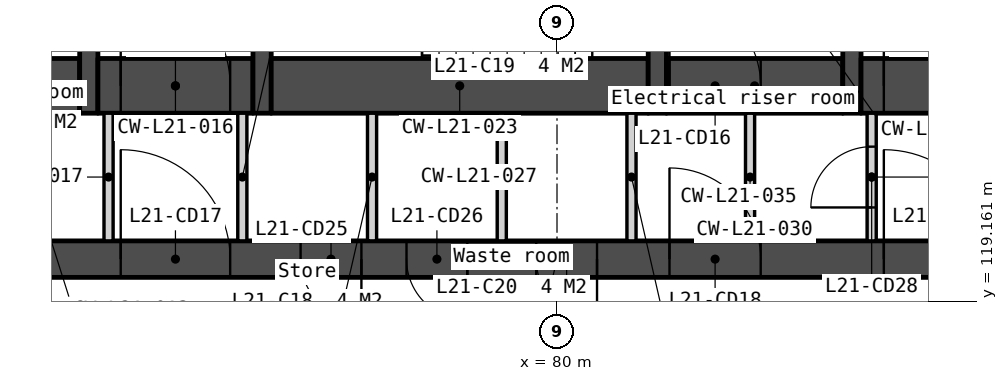
"""IFC4 building model, lengths in metres.
Left out: names, types, materials, properties, quantities, classifications, styles, units other than length and angle.
Written with IfcOpenShell. Run it as: python <this file> out.ifc"""

import sys

from ifc_helpers import new_model, si_unit, direction, frame, frame_2d, origin, place, context, subcontext, project, spatial, polyline, rectangle, outline, extrude, element, fill, save


model = new_model("IFC4")
c1 = context("Model", 3, precision=1e-05, world=origin(), true_north=direction((0.0, 1.0)))
c2 = subcontext(c1, "Body", "Model", "MODEL_VIEW")
j1 = project(units=[si_unit("LENGTHUNIT", "METRE"), si_unit("PLANEANGLEUNIT", "RADIAN")], contexts=[c1])
p1 = place(None, origin())
s1 = spatial("IfcSite", under=j1, at=p1, CompositionType="ELEMENT")
p2 = place(p1, origin())
s2 = spatial("IfcBuilding", under=s1, at=p2, CompositionType="ELEMENT")
p3 = place(p2, frame((0.0, 0.0, 88.8)))
s3 = spatial("IfcBuildingStorey", under=s2, at=p3, CompositionType="ELEMENT", Elevation=88.8)
p4 = place(p3, frame((66.0, 119.85, 0.0), z_axis=(0.0, 0.0, 1.0), x_axis=(1.0, 0.0, 0.0)))
e1 = element("IfcWall", 1, at=p4, inside=s3, PredefinedType="SOLIDWALL", context=c2, shape_type="SweptSolid", body=[
    extrude(rectangle(XDim=28.0, YDim=0.6, at=frame_2d((14.0, 0.0))), origin(), (0.0, 0.0, 1.0), 3.35),
])
p5 = place(p4, frame((6.825, 0.0, 0.0)))
e2 = element("IfcOpeningElement", 2, at=p5, cuts=e1, PredefinedType="OPENING", context=c2, shape_type="SweptSolid", body=[
    extrude(rectangle(XDim=1.8, YDim=2.1, at=frame_2d((0.9, 1.05))), frame((0.0, 0.31, 0.0), z_axis=(0.0, -1.0, 0.0), x_axis=(1.0, 0.0, 0.0)), (0.0, 0.0, 1.0), 0.62),
])
p6 = place(p4, frame((15.85, 0.0, 0.0)))
e3 = element("IfcOpeningElement", 3, at=p6, cuts=e1, PredefinedType="OPENING", context=c2, shape_type="SweptSolid", body=[
    extrude(rectangle(XDim=1.5, YDim=2.1, at=frame_2d((0.75, 1.05))), frame((0.0, 0.31, 0.0), z_axis=(0.0, -1.0, 0.0), x_axis=(1.0, 0.0, 0.0)), (0.0, 0.0, 1.0), 0.62),
])
p7 = place(p4, frame((19.375, 0.0, 0.0)))
e4 = element("IfcOpeningElement", 4, at=p7, cuts=e1, PredefinedType="OPENING", context=c2, shape_type="SweptSolid", body=[
    extrude(rectangle(XDim=1.8, YDim=2.1, at=frame_2d((0.9, 1.05))), frame((0.0, 0.31, 0.0), z_axis=(0.0, -1.0, 0.0), x_axis=(1.0, 0.0, 0.0)), (0.0, 0.0, 1.0), 0.62),
])
p8 = place(p4, frame((4.425, 0.0, 0.0)))
e5 = element("IfcOpeningElement", 5, at=p8, cuts=e1, PredefinedType="OPENING", context=c2, shape_type="SweptSolid", body=[
    extrude(rectangle(XDim=1.0, YDim=2.1, at=frame_2d((0.5, 1.05))), frame((0.0, 0.31, 0.0), z_axis=(0.0, -1.0, 0.0), x_axis=(1.0, 0.0, 0.0)), (0.0, 0.0, 1.0), 0.62),
])
p9 = place(p4, frame((9.783, 0.0, 0.0)))
e6 = element("IfcOpeningElement", 6, at=p9, cuts=e1, PredefinedType="OPENING", context=c2, shape_type="SweptSolid", body=[
    extrude(rectangle(XDim=1.0, YDim=2.1, at=frame_2d((0.5, 1.05))), frame((0.0, 0.31, 0.0), z_axis=(0.0, -1.0, 0.0), x_axis=(1.0, 0.0, 0.0)), (0.0, 0.0, 1.0), 0.62),
])
p10 = place(p4, frame((11.525, 0.0, 0.0)))
e7 = element("IfcOpeningElement", 7, at=p10, cuts=e1, PredefinedType="OPENING", context=c2, shape_type="SweptSolid", body=[
    extrude(rectangle(XDim=1.0, YDim=2.1, at=frame_2d((0.5, 1.05))), frame((0.0, 0.31, 0.0), z_axis=(0.0, -1.0, 0.0), x_axis=(1.0, 0.0, 0.0)), (0.0, 0.0, 1.0), 0.62),
])
p11 = place(p4, frame((13.658, 0.0, 0.0)))
e8 = element("IfcOpeningElement", 8, at=p11, cuts=e1, PredefinedType="OPENING", context=c2, shape_type="SweptSolid", body=[
    extrude(rectangle(XDim=1.0, YDim=2.1, at=frame_2d((0.5, 1.05))), frame((0.0, 0.31, 0.0), z_axis=(0.0, -1.0, 0.0), x_axis=(1.0, 0.0, 0.0)), (0.0, 0.0, 1.0), 0.62),
])
p12 = place(p4, frame((21.725, 0.0, 0.0)))
e9 = element("IfcOpeningElement", 9, at=p12, cuts=e1, PredefinedType="OPENING", context=c2, shape_type="SweptSolid", body=[
    extrude(rectangle(XDim=1.0, YDim=2.1, at=frame_2d((0.5, 1.05))), frame((0.0, 0.31, 0.0), z_axis=(0.0, -1.0, 0.0), x_axis=(1.0, 0.0, 0.0)), (0.0, 0.0, 1.0), 0.62),
])
p13 = place(p4, frame((23.425, 0.0, 0.0)))
e10 = element("IfcOpeningElement", 10, at=p13, cuts=e1, PredefinedType="OPENING", context=c2, shape_type="SweptSolid", body=[
    extrude(rectangle(XDim=1.0, YDim=2.1, at=frame_2d((0.5, 1.05))), frame((0.0, 0.31, 0.0), z_axis=(0.0, -1.0, 0.0), x_axis=(1.0, 0.0, 0.0)), (0.0, 0.0, 1.0), 0.62),
])
p14 = place(p3, frame((69.6, 122.7, 0.0), z_axis=(0.0, 0.0, 1.0), x_axis=(1.0, 0.0, 0.0)))
e11 = element("IfcWall", 11, at=p14, inside=s3, PredefinedType="SOLIDWALL", context=c2, shape_type="SweptSolid", body=[
    extrude(rectangle(XDim=2.55, YDim=0.9, at=frame_2d((1.275, 0.0))), origin(), (0.0, 0.0, 1.0), 3.35),
])
p15 = place(p3, frame((72.3, 133.95, 0.0), z_axis=(0.0, 0.0, 1.0), x_axis=(0.0, -1.0, 0.0)))
e12 = element("IfcWall", 12, at=p15, inside=s3, PredefinedType="SOLIDWALL", context=c2, shape_type="SweptSolid", body=[
    extrude(rectangle(XDim=11.7, YDim=0.3, at=frame_2d((5.85, 0.0))), origin(), (0.0, 0.0, 1.0), 3.35),
])
p16 = place(p15, frame((6.95, 0.0, 0.0)))
e13 = element("IfcOpeningElement", 13, at=p16, cuts=e12, PredefinedType="OPENING", context=c2, shape_type="SweptSolid", body=[
    extrude(rectangle(XDim=1.1, YDim=2.1, at=frame_2d((0.55, 1.05))), frame((0.0, 0.16, 0.0), z_axis=(0.0, -1.0, 0.0), x_axis=(1.0, 0.0, 0.0)), (0.0, 0.0, 1.0), 0.32),
])
p17 = place(p15, frame((9.35, 0.0, 0.0)))
e14 = element("IfcOpeningElement", 14, at=p17, cuts=e12, PredefinedType="OPENING", context=c2, shape_type="SweptSolid", body=[
    extrude(rectangle(XDim=0.9, YDim=2.1, at=frame_2d((0.45, 1.05))), frame((0.0, 0.16, 0.0), z_axis=(0.0, -1.0, 0.0), x_axis=(1.0, 0.0, 0.0)), (0.0, 0.0, 1.0), 0.32),
])
p18 = place(p15, frame((5.1, 0.0, 0.0)))
e15 = element("IfcOpeningElement", 15, at=p18, cuts=e12, PredefinedType="OPENING", context=c2, shape_type="SweptSolid", body=[
    extrude(rectangle(XDim=1.0, YDim=2.1, at=frame_2d((0.5, 1.05))), frame((0.0, 0.16, 0.0), z_axis=(0.0, -1.0, 0.0), x_axis=(1.0, 0.0, 0.0)), (0.0, 0.0, 1.0), 0.32),
])
p19 = place(p3, frame((72.45, 122.7, 0.0), z_axis=(0.0, 0.0, 1.0), x_axis=(1.0, 0.0, 0.0)))
e16 = element("IfcWall", 16, at=p19, inside=s3, PredefinedType="SOLIDWALL", context=c2, shape_type="SweptSolid", body=[
    extrude(rectangle(XDim=2.55, YDim=0.9, at=frame_2d((1.275, 0.0))), origin(), (0.0, 0.0, 1.0), 3.35),
])
p20 = place(p19, frame((0.375, 0.0, 0.0)))
e17 = element("IfcOpeningElement", 17, at=p20, cuts=e16, PredefinedType="OPENING", context=c2, shape_type="SweptSolid", body=[
    extrude(rectangle(XDim=1.8, YDim=2.1, at=frame_2d((0.9, 1.05))), frame((0.0, 0.46, 0.0), z_axis=(0.0, -1.0, 0.0), x_axis=(1.0, 0.0, 0.0)), (0.0, 0.0, 1.0), 0.92),
])
for number, where, z_axis, x_axis in (
    (18, (72.625, 122.25, 0.0), (0.0, 0.0, 1.0), (0.0, -1.0, 0.0)),
    (19, (74.825, 122.25, 0.0), (0.0, 0.0, 1.0), (0.0, -1.0, 0.0)),
):
    element("IfcWall", number, at=place(p3, frame(where, z_axis=z_axis, x_axis=x_axis)), inside=s3, PredefinedType="PARTITIONING", context=c2, shape_type="SweptSolid", body=[
        extrude(rectangle(XDim=2.1, YDim=0.15, at=frame_2d((1.05, 0.0))), origin(), (0.0, 0.0, 1.0), 3.35),
    ])
p21 = place(p3, frame((75.15, 133.95, 0.0), z_axis=(0.0, 0.0, 1.0), x_axis=(0.0, -1.0, 0.0)))
e20 = element("IfcWall", 20, at=p21, inside=s3, PredefinedType="SOLIDWALL", context=c2, shape_type="SweptSolid", body=[
    extrude(rectangle(XDim=11.7, YDim=0.3, at=frame_2d((5.85, 0.0))), origin(), (0.0, 0.0, 1.0), 3.35),
])
p22 = place(p3, frame((75.3, 122.7, 0.0), z_axis=(0.0, 0.0, 1.0), x_axis=(1.0, 0.0, 0.0)))
e21 = element("IfcWall", 21, at=p22, inside=s3, PredefinedType="SOLIDWALL", context=c2, shape_type="SweptSolid", body=[
    extrude(rectangle(XDim=6.2, YDim=0.9, at=frame_2d((3.1, 0.0))), origin(), (0.0, 0.0, 1.0), 3.35),
])
for number, where, z_axis, x_axis in (
    (22, (76.958, 122.25, 0.0), (0.0, 0.0, 1.0), (0.0, -1.0, 0.0)),
    (23, (79.092, 122.25, 0.0), (0.0, 0.0, 1.0), (0.0, -1.0, 0.0)),
    (24, (81.225, 122.25, 0.0), (0.0, 0.0, 1.0), (0.0, -1.0, 0.0)),
):
    element("IfcWall", number, at=place(p3, frame(where, z_axis=z_axis, x_axis=x_axis)), inside=s3, PredefinedType="PARTITIONING", context=c2, shape_type="SweptSolid", body=[
        extrude(rectangle(XDim=2.1, YDim=0.15, at=frame_2d((1.05, 0.0))), origin(), (0.0, 0.0, 1.0), 3.35),
    ])
p23 = place(p3, frame((81.65, 125.7, 0.0), z_axis=(0.0, 0.0, 1.0), x_axis=(0.0, -1.0, 0.0)))
e25 = element("IfcWall", 25, at=p23, inside=s3, PredefinedType="SOLIDWALL", context=c2, shape_type="SweptSolid", body=[
    extrude(rectangle(XDim=3.45, YDim=0.3, at=frame_2d((1.725, 0.0))), origin(), (0.0, 0.0, 1.0), 3.35),
])
p24 = place(p23, frame((0.75, 0.0, 0.0)))
e26 = element("IfcOpeningElement", 26, at=p24, cuts=e25, PredefinedType="OPENING", context=c2, shape_type="SweptSolid", body=[
    extrude(rectangle(XDim=1.0, YDim=2.1, at=frame_2d((0.5, 1.05))), frame((0.0, 0.16, 0.0), z_axis=(0.0, -1.0, 0.0), x_axis=(1.0, 0.0, 0.0)), (0.0, 0.0, 1.0), 0.32),
])
p25 = place(p3, frame((81.8, 122.7, 0.0), z_axis=(0.0, 0.0, 1.0), x_axis=(1.0, 0.0, 0.0)))
e27 = element("IfcWall", 27, at=p25, inside=s3, PredefinedType="SOLIDWALL", context=c2, shape_type="SweptSolid", body=[
    extrude(rectangle(XDim=2.9, YDim=0.9, at=frame_2d((1.45, 0.0))), origin(), (0.0, 0.0, 1.0), 3.35),
])
p26 = place(p25, frame((0.05, 0.0, 0.0)))
e28 = element("IfcOpeningElement", 28, at=p26, cuts=e27, PredefinedType="OPENING", context=c2, shape_type="SweptSolid", body=[
    extrude(rectangle(XDim=1.5, YDim=2.1, at=frame_2d((0.75, 1.05))), frame((0.0, 0.46, 0.0), z_axis=(0.0, -1.0, 0.0), x_axis=(1.0, 0.0, 0.0)), (0.0, 0.0, 1.0), 0.92),
])
p27 = place(p3, frame((83.175, 122.25, 0.0), z_axis=(0.0, 0.0, 1.0), x_axis=(0.0, -1.0, 0.0)))
e29 = element("IfcWall", 29, at=p27, inside=s3, PredefinedType="PARTITIONING", context=c2, shape_type="SweptSolid", body=[
    extrude(rectangle(XDim=2.1, YDim=0.15, at=frame_2d((1.05, 0.0))), origin(), (0.0, 0.0, 1.0), 3.35),
])
p28 = place(p3, frame((84.85, 133.95, 0.0), z_axis=(0.0, 0.0, 1.0), x_axis=(0.0, -1.0, 0.0)))
e30 = element("IfcWall", 30, at=p28, inside=s3, PredefinedType="SOLIDWALL", context=c2, shape_type="SweptSolid", body=[
    extrude(rectangle(XDim=11.7, YDim=0.3, at=frame_2d((5.85, 0.0))), origin(), (0.0, 0.0, 1.0), 3.35),
])
p29 = place(p3, frame((85.0, 122.7, 0.0), z_axis=(0.0, 0.0, 1.0), x_axis=(1.0, 0.0, 0.0)))
e31 = element("IfcWall", 31, at=p29, inside=s3, PredefinedType="SOLIDWALL", context=c2, shape_type="SweptSolid", body=[
    extrude(rectangle(XDim=2.55, YDim=0.9, at=frame_2d((1.275, 0.0))), origin(), (0.0, 0.0, 1.0), 3.35),
])
p30 = place(p29, frame((0.375, 0.0, 0.0)))
e32 = element("IfcOpeningElement", 32, at=p30, cuts=e31, PredefinedType="OPENING", context=c2, shape_type="SweptSolid", body=[
    extrude(rectangle(XDim=1.8, YDim=2.1, at=frame_2d((0.9, 1.05))), frame((0.0, 0.46, 0.0), z_axis=(0.0, -1.0, 0.0), x_axis=(1.0, 0.0, 0.0)), (0.0, 0.0, 1.0), 0.92),
])
p31 = place(p3, frame((85.175, 122.25, 0.0), z_axis=(0.0, 0.0, 1.0), x_axis=(0.0, -1.0, 0.0)))
e33 = element("IfcWall", 33, at=p31, inside=s3, PredefinedType="PARTITIONING", context=c2, shape_type="SweptSolid", body=[
    extrude(rectangle(XDim=2.1, YDim=0.15, at=frame_2d((1.05, 0.0))), origin(), (0.0, 0.0, 1.0), 3.35),
])
p32 = place(p31, frame((0.55, 0.0, 0.0)))
e34 = element("IfcOpeningElement", 34, at=p32, cuts=e33, PredefinedType="OPENING", context=c2, shape_type="SweptSolid", body=[
    extrude(rectangle(XDim=1.0, YDim=2.1, at=frame_2d((0.5, 1.05))), frame((0.0, 0.085, 0.0), z_axis=(0.0, -1.0, 0.0), x_axis=(1.0, 0.0, 0.0)), (0.0, 0.0, 1.0), 0.17),
])
p33 = place(p3, frame((56.073, 130.263, -0.15), z_axis=(0.0, 0.0, 1.0), x_axis=(0.500000478905, -0.866025127289, 0.0)))
e35 = element("IfcWall", 35, at=p33, inside=s3, PredefinedType="SOLIDWALL", context=c2, shape_type="SweptSolid", body=[
    extrude(outline(polyline([(42.643, 0.0), (42.643, 3.5), (0.0, 3.5), (0.0, 0.0), (42.643, 0.0)])), frame((0.0, 0.225, 0.0), z_axis=(0.0, -1.0, 0.0), x_axis=(1.0, 0.0, 0.0)), (0.0, 0.0, 1.0), 0.45),
])
p34 = place(p33, frame((0.72, 0.0, 1.05)))
e36 = element("IfcOpeningElement", 36, at=p34, cuts=e35, PredefinedType="OPENING", context=c2, shape_type="SweptSolid", body=[
    extrude(rectangle(XDim=1.2, YDim=1.5, at=frame_2d((0.6, 0.75))), frame((0.0, 0.235, 0.0), z_axis=(0.0, -1.0, 0.0), x_axis=(1.0, 0.0, 0.0)), (0.0, 0.0, 1.0), 0.47),
])
p35 = place(p33, frame((7.079, 0.0, 1.05)))
e37 = element("IfcOpeningElement", 37, at=p35, cuts=e35, PredefinedType="OPENING", context=c2, shape_type="SweptSolid", body=[
    extrude(rectangle(XDim=1.2, YDim=1.5, at=frame_2d((0.6, 0.75))), frame((0.0, 0.235, 0.0), z_axis=(0.0, -1.0, 0.0), x_axis=(1.0, 0.0, 0.0)), (0.0, 0.0, 1.0), 0.47),
])
p36 = place(p33, frame((8.779, 0.0, 1.05)))
e38 = element("IfcOpeningElement", 38, at=p36, cuts=e35, PredefinedType="OPENING", context=c2, shape_type="SweptSolid", body=[
    extrude(rectangle(XDim=1.2, YDim=1.5, at=frame_2d((0.6, 0.75))), frame((0.0, 0.235, 0.0), z_axis=(0.0, -1.0, 0.0), x_axis=(1.0, 0.0, 0.0)), (0.0, 0.0, 1.0), 0.47),
])
p37 = place(p33, frame((15.607, 0.0, 1.05)))
e39 = element("IfcOpeningElement", 39, at=p37, cuts=e35, PredefinedType="OPENING", context=c2, shape_type="SweptSolid", body=[
    extrude(rectangle(XDim=1.2, YDim=1.5, at=frame_2d((0.6, 0.75))), frame((0.0, 0.235, 0.0), z_axis=(0.0, -1.0, 0.0), x_axis=(1.0, 0.0, 0.0)), (0.0, 0.0, 1.0), 0.47),
])
p38 = place(p33, frame((17.307, 0.0, 1.05)))
e40 = element("IfcOpeningElement", 40, at=p38, cuts=e35, PredefinedType="OPENING", context=c2, shape_type="SweptSolid", body=[
    extrude(rectangle(XDim=1.2, YDim=1.5, at=frame_2d((0.6, 0.75))), frame((0.0, 0.235, 0.0), z_axis=(0.0, -1.0, 0.0), x_axis=(1.0, 0.0, 0.0)), (0.0, 0.0, 1.0), 0.47),
])
p39 = place(p33, frame((24.136, 0.0, 1.05)))
e41 = element("IfcOpeningElement", 41, at=p39, cuts=e35, PredefinedType="OPENING", context=c2, shape_type="SweptSolid", body=[
    extrude(rectangle(XDim=1.2, YDim=1.5, at=frame_2d((0.6, 0.75))), frame((0.0, 0.235, 0.0), z_axis=(0.0, -1.0, 0.0), x_axis=(1.0, 0.0, 0.0)), (0.0, 0.0, 1.0), 0.47),
])
p40 = place(p33, frame((25.836, 0.0, 1.05)))
e42 = element("IfcOpeningElement", 42, at=p40, cuts=e35, PredefinedType="OPENING", context=c2, shape_type="SweptSolid", body=[
    extrude(rectangle(XDim=1.2, YDim=1.5, at=frame_2d((0.6, 0.75))), frame((0.0, 0.235, 0.0), z_axis=(0.0, -1.0, 0.0), x_axis=(1.0, 0.0, 0.0)), (0.0, 0.0, 1.0), 0.47),
])
p41 = place(p33, frame((32.665, 0.0, 1.05)))
e43 = element("IfcOpeningElement", 43, at=p41, cuts=e35, PredefinedType="OPENING", context=c2, shape_type="SweptSolid", body=[
    extrude(rectangle(XDim=1.2, YDim=1.5, at=frame_2d((0.6, 0.75))), frame((0.0, 0.235, 0.0), z_axis=(0.0, -1.0, 0.0), x_axis=(1.0, 0.0, 0.0)), (0.0, 0.0, 1.0), 0.47),
])
p42 = place(p33, frame((34.365, 0.0, 1.05)))
e44 = element("IfcOpeningElement", 44, at=p42, cuts=e35, PredefinedType="OPENING", context=c2, shape_type="SweptSolid", body=[
    extrude(rectangle(XDim=1.2, YDim=1.5, at=frame_2d((0.6, 0.75))), frame((0.0, 0.235, 0.0), z_axis=(0.0, -1.0, 0.0), x_axis=(1.0, 0.0, 0.0)), (0.0, 0.0, 1.0), 0.47),
])
p43 = place(p33, frame((40.722, 0.0, 1.05)))
e45 = element("IfcOpeningElement", 45, at=p43, cuts=e35, PredefinedType="OPENING", context=c2, shape_type="SweptSolid", body=[
    extrude(rectangle(XDim=1.2, YDim=1.5, at=frame_2d((0.6, 0.75))), frame((0.0, 0.235, 0.0), z_axis=(0.0, -1.0, 0.0), x_axis=(1.0, 0.0, 0.0)), (0.0, 0.0, 1.0), 0.47),
])
p44 = place(p3, frame((82.605, 93.333, -0.15), z_axis=(0.0, 0.0, 1.0), x_axis=(0.500000478905, 0.866025127289, 0.0)))
e46 = element("IfcWall", 46, at=p44, inside=s3, PredefinedType="SOLIDWALL", context=c2, shape_type="SweptSolid", body=[
    extrude(outline(polyline([(42.643, 0.0), (42.643, 3.5), (0.0, 3.5), (0.0, 0.0), (42.643, 0.0)])), frame((0.0, 0.225, 0.0), z_axis=(0.0, -1.0, 0.0), x_axis=(1.0, 0.0, 0.0)), (0.0, 0.0, 1.0), 0.45),
])
p45 = place(p44, frame((0.72, 0.0, 1.05)))
e47 = element("IfcOpeningElement", 47, at=p45, cuts=e46, PredefinedType="OPENING", context=c2, shape_type="SweptSolid", body=[
    extrude(rectangle(XDim=1.2, YDim=1.5, at=frame_2d((0.6, 0.75))), frame((0.0, 0.235, 0.0), z_axis=(0.0, -1.0, 0.0), x_axis=(1.0, 0.0, 0.0)), (0.0, 0.0, 1.0), 0.47),
])
p46 = place(p44, frame((7.079, 0.0, 1.05)))
e48 = element("IfcOpeningElement", 48, at=p46, cuts=e46, PredefinedType="OPENING", context=c2, shape_type="SweptSolid", body=[
    extrude(rectangle(XDim=1.2, YDim=1.5, at=frame_2d((0.6, 0.75))), frame((0.0, 0.235, 0.0), z_axis=(0.0, -1.0, 0.0), x_axis=(1.0, 0.0, 0.0)), (0.0, 0.0, 1.0), 0.47),
])
p47 = place(p44, frame((8.779, 0.0, 1.05)))
e49 = element("IfcOpeningElement", 49, at=p47, cuts=e46, PredefinedType="OPENING", context=c2, shape_type="SweptSolid", body=[
    extrude(rectangle(XDim=1.2, YDim=1.5, at=frame_2d((0.6, 0.75))), frame((0.0, 0.235, 0.0), z_axis=(0.0, -1.0, 0.0), x_axis=(1.0, 0.0, 0.0)), (0.0, 0.0, 1.0), 0.47),
])
p48 = place(p44, frame((15.607, 0.0, 1.05)))
e50 = element("IfcOpeningElement", 50, at=p48, cuts=e46, PredefinedType="OPENING", context=c2, shape_type="SweptSolid", body=[
    extrude(rectangle(XDim=1.2, YDim=1.5, at=frame_2d((0.6, 0.75))), frame((0.0, 0.235, 0.0), z_axis=(0.0, -1.0, 0.0), x_axis=(1.0, 0.0, 0.0)), (0.0, 0.0, 1.0), 0.47),
])
p49 = place(p44, frame((17.307, 0.0, 1.05)))
e51 = element("IfcOpeningElement", 51, at=p49, cuts=e46, PredefinedType="OPENING", context=c2, shape_type="SweptSolid", body=[
    extrude(rectangle(XDim=1.2, YDim=1.5, at=frame_2d((0.6, 0.75))), frame((0.0, 0.235, 0.0), z_axis=(0.0, -1.0, 0.0), x_axis=(1.0, 0.0, 0.0)), (0.0, 0.0, 1.0), 0.47),
])
p50 = place(p44, frame((24.136, 0.0, 1.05)))
e52 = element("IfcOpeningElement", 52, at=p50, cuts=e46, PredefinedType="OPENING", context=c2, shape_type="SweptSolid", body=[
    extrude(rectangle(XDim=1.2, YDim=1.5, at=frame_2d((0.6, 0.75))), frame((0.0, 0.235, 0.0), z_axis=(0.0, -1.0, 0.0), x_axis=(1.0, 0.0, 0.0)), (0.0, 0.0, 1.0), 0.47),
])
p51 = place(p44, frame((25.836, 0.0, 1.05)))
e53 = element("IfcOpeningElement", 53, at=p51, cuts=e46, PredefinedType="OPENING", context=c2, shape_type="SweptSolid", body=[
    extrude(rectangle(XDim=1.2, YDim=1.5, at=frame_2d((0.6, 0.75))), frame((0.0, 0.235, 0.0), z_axis=(0.0, -1.0, 0.0), x_axis=(1.0, 0.0, 0.0)), (0.0, 0.0, 1.0), 0.47),
])
p52 = place(p44, frame((32.665, 0.0, 1.05)))
e54 = element("IfcOpeningElement", 54, at=p52, cuts=e46, PredefinedType="OPENING", context=c2, shape_type="SweptSolid", body=[
    extrude(rectangle(XDim=1.2, YDim=1.5, at=frame_2d((0.6, 0.75))), frame((0.0, 0.235, 0.0), z_axis=(0.0, -1.0, 0.0), x_axis=(1.0, 0.0, 0.0)), (0.0, 0.0, 1.0), 0.47),
])
p53 = place(p44, frame((34.365, 0.0, 1.05)))
e55 = element("IfcOpeningElement", 55, at=p53, cuts=e46, PredefinedType="OPENING", context=c2, shape_type="SweptSolid", body=[
    extrude(rectangle(XDim=1.2, YDim=1.5, at=frame_2d((0.6, 0.75))), frame((0.0, 0.235, 0.0), z_axis=(0.0, -1.0, 0.0), x_axis=(1.0, 0.0, 0.0)), (0.0, 0.0, 1.0), 0.47),
])
p54 = place(p44, frame((40.722, 0.0, 1.05)))
e56 = element("IfcOpeningElement", 56, at=p54, cuts=e46, PredefinedType="OPENING", context=c2, shape_type="SweptSolid", body=[
    extrude(rectangle(XDim=1.2, YDim=1.5, at=frame_2d((0.6, 0.75))), frame((0.0, 0.235, 0.0), z_axis=(0.0, -1.0, 0.0), x_axis=(1.0, 0.0, 0.0)), (0.0, 0.0, 1.0), 0.47),
])
p55 = place(p30, origin())
e57 = element("IfcDoor", 57, at=p55, inside=s3, OperationType="DOUBLE_DOOR_DOUBLE_SWING", PredefinedType="DOOR", context=c2, shape_type="SweptSolid", body=[
    extrude(rectangle(XDim=1.8, YDim=2.1, at=frame_2d((0.9, 1.05))), frame((0.0, 0.025, 0.0), z_axis=(0.0, -1.0, 0.0), x_axis=(1.0, 0.0, 0.0)), (0.0, 0.0, 1.0), 0.05),
])
fill(e32, e57)
p56 = place(p20, origin())
e58 = element("IfcDoor", 58, at=p56, inside=s3, OperationType="DOUBLE_DOOR_DOUBLE_SWING", PredefinedType="DOOR", context=c2, shape_type="SweptSolid", body=[
    extrude(rectangle(XDim=1.8, YDim=2.1, at=frame_2d((0.9, 1.05))), frame((0.0, 0.025, 0.0), z_axis=(0.0, -1.0, 0.0), x_axis=(1.0, 0.0, 0.0)), (0.0, 0.0, 1.0), 0.05),
])
fill(e17, e58)
p57 = place(p26, origin())
e59 = element("IfcDoor", 59, at=p57, inside=s3, OperationType="DOUBLE_DOOR_DOUBLE_SWING", PredefinedType="DOOR", context=c2, shape_type="SweptSolid", body=[
    extrude(rectangle(XDim=1.5, YDim=2.1, at=frame_2d((0.75, 1.05))), frame((0.0, 0.025, 0.0), z_axis=(0.0, -1.0, 0.0), x_axis=(1.0, 0.0, 0.0)), (0.0, 0.0, 1.0), 0.05),
])
fill(e28, e59)
p58 = place(p5, origin())
e60 = element("IfcDoor", 60, at=p58, inside=s3, OperationType="DOUBLE_DOOR_DOUBLE_SWING", PredefinedType="DOOR", context=c2, shape_type="SweptSolid", body=[
    extrude(rectangle(XDim=1.8, YDim=2.1, at=frame_2d((0.9, 1.05))), frame((0.0, 0.025, 0.0), z_axis=(0.0, -1.0, 0.0), x_axis=(1.0, 0.0, 0.0)), (0.0, 0.0, 1.0), 0.05),
])
fill(e2, e60)
p59 = place(p6, origin())
e61 = element("IfcDoor", 61, at=p59, inside=s3, OperationType="DOUBLE_DOOR_DOUBLE_SWING", PredefinedType="DOOR", context=c2, shape_type="SweptSolid", body=[
    extrude(rectangle(XDim=1.5, YDim=2.1, at=frame_2d((0.75, 1.05))), frame((0.0, 0.025, 0.0), z_axis=(0.0, -1.0, 0.0), x_axis=(1.0, 0.0, 0.0)), (0.0, 0.0, 1.0), 0.05),
])
fill(e3, e61)
p60 = place(p7, origin())
e62 = element("IfcDoor", 62, at=p60, inside=s3, OperationType="DOUBLE_DOOR_DOUBLE_SWING", PredefinedType="DOOR", context=c2, shape_type="SweptSolid", body=[
    extrude(rectangle(XDim=1.8, YDim=2.1, at=frame_2d((0.9, 1.05))), frame((0.0, 0.025, 0.0), z_axis=(0.0, -1.0, 0.0), x_axis=(1.0, 0.0, 0.0)), (0.0, 0.0, 1.0), 0.05),
])
fill(e4, e62)
p61 = place(p9, origin())
e63 = element("IfcDoor", 63, at=p61, inside=s3, OperationType="SINGLE_SWING_RIGHT", PredefinedType="DOOR", context=c2, shape_type="SweptSolid", body=[
    extrude(rectangle(XDim=1.0, YDim=2.1, at=frame_2d((0.5, 1.05))), frame((0.0, 0.025, 0.0), z_axis=(0.0, -1.0, 0.0), x_axis=(1.0, 0.0, 0.0)), (0.0, 0.0, 1.0), 0.05),
])
fill(e6, e63)
p62 = place(p10, origin())
e64 = element("IfcDoor", 64, at=p62, inside=s3, OperationType="SINGLE_SWING_RIGHT", PredefinedType="DOOR", context=c2, shape_type="SweptSolid", body=[
    extrude(rectangle(XDim=1.0, YDim=2.1, at=frame_2d((0.5, 1.05))), frame((0.0, 0.025, 0.0), z_axis=(0.0, -1.0, 0.0), x_axis=(1.0, 0.0, 0.0)), (0.0, 0.0, 1.0), 0.05),
])
fill(e7, e64)
p63 = place(p11, origin())
e65 = element("IfcDoor", 65, at=p63, inside=s3, OperationType="SINGLE_SWING_RIGHT", PredefinedType="DOOR", context=c2, shape_type="SweptSolid", body=[
    extrude(rectangle(XDim=1.0, YDim=2.1, at=frame_2d((0.5, 1.05))), frame((0.0, 0.025, 0.0), z_axis=(0.0, -1.0, 0.0), x_axis=(1.0, 0.0, 0.0)), (0.0, 0.0, 1.0), 0.05),
])
fill(e8, e65)
p64 = place(p32, origin())
e66 = element("IfcDoor", 66, at=p64, inside=s3, OperationType="SINGLE_SWING_RIGHT", PredefinedType="DOOR", context=c2, shape_type="SweptSolid", body=[
    extrude(rectangle(XDim=1.0, YDim=2.1, at=frame_2d((0.5, 1.05))), frame((0.0, 0.025, 0.0), z_axis=(0.0, -1.0, 0.0), x_axis=(1.0, 0.0, 0.0)), (0.0, 0.0, 1.0), 0.05),
])
fill(e34, e66)
save(model, sys.argv[1])
